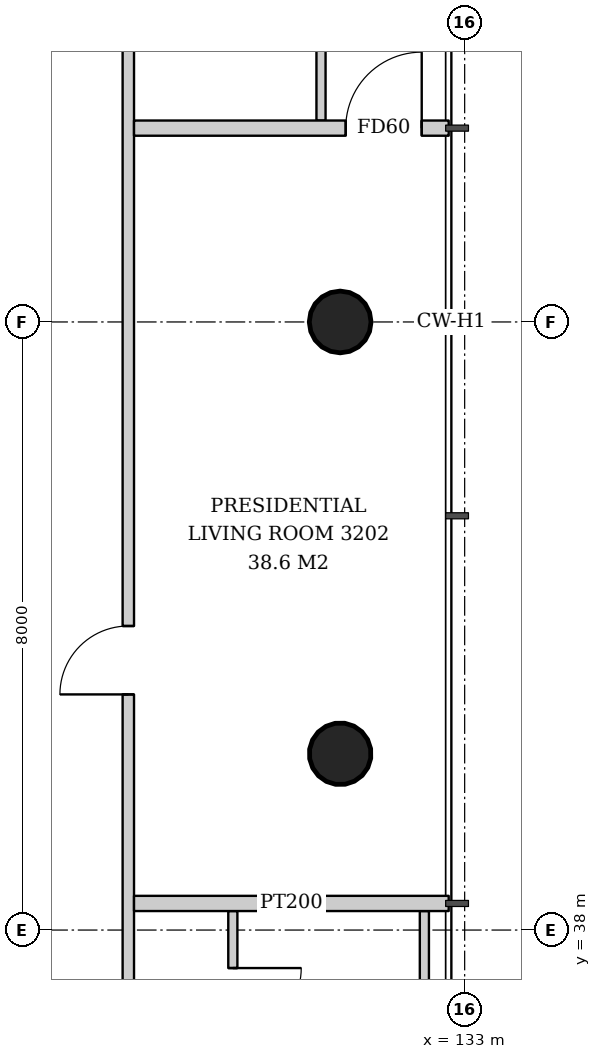
"""IFC4 building model, lengths in metres.
Left out: names, types, materials, properties, quantities, classifications, styles, units other than length and angle.
Written with IfcOpenShell. Run it as: python <this file> out.ifc"""

import sys

from ifc_helpers import new_model, si_unit, direction, frame, frame_2d, origin, origin_2d, place, context, subcontext, project, spatial, rectangle, hollow_circle, extrude, element, fill, save


model = new_model("IFC4")
c1 = context("Model", 3, precision=1e-05, world=origin(), true_north=direction((0.0, 1.0)))
c2 = subcontext(c1, "Body", "Model", "MODEL_VIEW")
j1 = project(units=[si_unit("LENGTHUNIT", "METRE"), si_unit("PLANEANGLEUNIT", "RADIAN")], contexts=[c1])
p1 = place(None, origin())
s1 = spatial("IfcSite", under=j1, at=p1, CompositionType="ELEMENT")
p2 = place(p1, origin())
s2 = spatial("IfcBuilding", under=s1, at=p2, CompositionType="ELEMENT")
p3 = place(p2, frame((0.0, 0.0, 127.4)))
s3 = spatial("IfcBuildingStorey", under=s2, at=p3, CompositionType="ELEMENT", Elevation=127.4)
p4 = place(p3, frame((131.414, 40.293, 0.0), z_axis=(-0.043059584825, 0.021497706284, 0.998841188968), x_axis=(-0.446680166538, -0.894693706707, 0.0)))
e1 = element("IfcColumn", 1, at=p4, inside=s3, PredefinedType="COLUMN", context=c2, shape_type="SweptSolid", body=[
    extrude(hollow_circle(Radius=0.406, WallThickness=0.03, at=origin_2d()), origin(), (0.0, 0.0, 1.0), 3.804),
])
p5 = place(p3, frame((131.414, 46.0, 0.0), z_axis=(-0.043069538298, 0.0, 0.999072076915), x_axis=(0.0, -1.0, 0.0)))
e2 = element("IfcColumn", 2, at=p5, inside=s3, PredefinedType="COLUMN", context=c2, shape_type="SweptSolid", body=[
    extrude(hollow_circle(Radius=0.406, WallThickness=0.03, at=origin_2d()), origin(), (0.0, 0.0, 1.0), 3.803),
])
p6 = place(p3, frame((129.95, 38.25, 0.0), z_axis=(0.0, 0.0, 1.0), x_axis=(0.0, -1.0, 0.0)))
e3 = element("IfcWall", 3, at=p6, inside=s3, PredefinedType="PARTITIONING", context=c2, shape_type="SweptSolid", body=[
    extrude(rectangle(XDim=2.58, YDim=0.12, at=frame_2d((1.29, 0.0))), origin(), (0.0, 0.0, 1.0), 2.338),
])
p7 = place(p6, frame((0.75, 0.0, 0.0)))
e4 = element("IfcOpeningElement", 4, at=p7, cuts=e3, PredefinedType="OPENING", context=c2, shape_type="SweptSolid", body=[
    extrude(rectangle(XDim=0.9, YDim=2.1, at=frame_2d((0.45, 1.05))), frame((0.0, 0.07, 0.0), z_axis=(0.0, -1.0, 0.0), x_axis=(1.0, 0.0, 0.0)), (0.0, 0.0, 1.0), 0.14),
])
p8 = place(p3, frame((132.47, 38.25, 0.0), z_axis=(0.0, 0.0, 1.0), x_axis=(0.0, -1.0, 0.0)))
e5 = element("IfcWall", 5, at=p8, inside=s3, PredefinedType="PARTITIONING", context=c2, shape_type="SweptSolid", body=[
    extrude(rectangle(XDim=2.58, YDim=0.12, at=frame_2d((1.29, 0.0))), origin(), (0.0, 0.0, 1.0), 3.35),
])
p9 = place(p3, frame((131.11, 48.65, 0.0), z_axis=(0.0, 0.0, 1.0), x_axis=(0.0, 1.0, 0.0)))
e6 = element("IfcWall", 6, at=p9, inside=s3, PredefinedType="PARTITIONING", context=c2, shape_type="SweptSolid", body=[
    extrude(rectangle(XDim=2.52, YDim=0.12, at=frame_2d((1.26, 0.0))), origin(), (0.0, 0.0, 1.0), 2.35),
])
p10 = place(p3, frame((128.575, 35.207, 0.0), z_axis=(0.0, 0.0, 1.0), x_axis=(0.0, 1.0, 0.0)))
e7 = element("IfcWall", 7, at=p10, inside=s3, PredefinedType="PARTITIONING", context=c2, shape_type="SweptSolid", body=[
    extrude(rectangle(XDim=21.586, YDim=0.15, at=frame_2d((10.793, 0.0))), origin(), (0.0, 0.0, 1.0), 2.338),
])
p11 = place(p10, frame((0.718, 0.0, 0.0)))
e8 = element("IfcOpeningElement", 8, at=p11, cuts=e7, PredefinedType="OPENING", context=c2, shape_type="SweptSolid", body=[
    extrude(rectangle(XDim=0.9, YDim=2.1, at=frame_2d((0.45, 1.05))), frame((0.0, 0.085, 0.0), z_axis=(0.0, -1.0, 0.0), x_axis=(1.0, 0.0, 0.0)), (0.0, 0.0, 1.0), 0.17),
])
p12 = place(p10, frame((5.893, 0.0, 0.0)))
e9 = element("IfcOpeningElement", 9, at=p12, cuts=e7, PredefinedType="OPENING", context=c2, shape_type="SweptSolid", body=[
    extrude(rectangle(XDim=0.9, YDim=2.1, at=frame_2d((0.45, 1.05))), frame((0.0, 0.085, 0.0), z_axis=(0.0, -1.0, 0.0), x_axis=(1.0, 0.0, 0.0)), (0.0, 0.0, 1.0), 0.17),
])
p13 = place(p3, frame((128.65, 38.35, 0.0), z_axis=(0.0, 0.0, 1.0), x_axis=(1.0, 0.0, 0.0)))
e10 = element("IfcWall", 10, at=p13, inside=s3, PredefinedType="PARTITIONING", context=c2, shape_type="SweptSolid", body=[
    extrude(rectangle(XDim=4.14, YDim=0.2, at=frame_2d((2.07, 0.0))), origin(), (0.0, 0.0, 1.0), 2.35),
])
p14 = place(p3, frame((128.65, 48.55, 0.0), z_axis=(0.0, 0.0, 1.0), x_axis=(1.0, 0.0, 0.0)))
e11 = element("IfcWall", 11, at=p14, inside=s3, PredefinedType="PARTITIONING", context=c2, shape_type="SweptSolid", body=[
    extrude(rectangle(XDim=4.14, YDim=0.2, at=frame_2d((2.07, 0.0))), origin(), (0.0, 0.0, 1.0), 2.35),
])
p15 = place(p14, frame((2.785, 0.0, 0.0)))
e12 = element("IfcOpeningElement", 12, at=p15, cuts=e11, PredefinedType="OPENING", context=c2, shape_type="SweptSolid", body=[
    extrude(rectangle(XDim=1.0, YDim=2.1, at=frame_2d((0.5, 1.05))), frame((0.0, 0.11, 0.0), z_axis=(0.0, -1.0, 0.0), x_axis=(1.0, 0.0, 0.0)), (0.0, 0.0, 1.0), 0.22),
])
p16 = place(p7, origin())
e13 = element("IfcDoor", 13, at=p16, inside=s3, OperationType="SINGLE_SWING_LEFT", PredefinedType="DOOR", context=c2, shape_type="SweptSolid", body=[
    extrude(rectangle(XDim=0.9, YDim=2.1, at=frame_2d((0.45, 1.05))), frame((0.0, 0.025, 0.0), z_axis=(0.0, -1.0, 0.0), x_axis=(1.0, 0.0, 0.0)), (0.0, 0.0, 1.0), 0.05),
])
fill(e4, e13)
p17 = place(p12, origin())
e14 = element("IfcDoor", 14, at=p17, inside=s3, OperationType="SINGLE_SWING_LEFT", PredefinedType="DOOR", context=c2, shape_type="SweptSolid", body=[
    extrude(rectangle(XDim=0.9, YDim=2.1, at=frame_2d((0.45, 1.05))), frame((0.0, 0.025, 0.0), z_axis=(0.0, -1.0, 0.0), x_axis=(1.0, 0.0, 0.0)), (0.0, 0.0, 1.0), 0.05),
])
fill(e9, e14)
p18 = place(p15, origin())
e15 = element("IfcDoor", 15, at=p18, inside=s3, OperationType="SINGLE_SWING_RIGHT", PredefinedType="DOOR", context=c2, shape_type="SweptSolid", body=[
    extrude(rectangle(XDim=1.0, YDim=2.1, at=frame_2d((0.5, 1.05))), frame((0.0, 0.025, 0.0), z_axis=(0.0, -1.0, 0.0), x_axis=(1.0, 0.0, 0.0)), (0.0, 0.0, 1.0), 0.05),
])
fill(e12, e15)
save(model, sys.argv[1])
